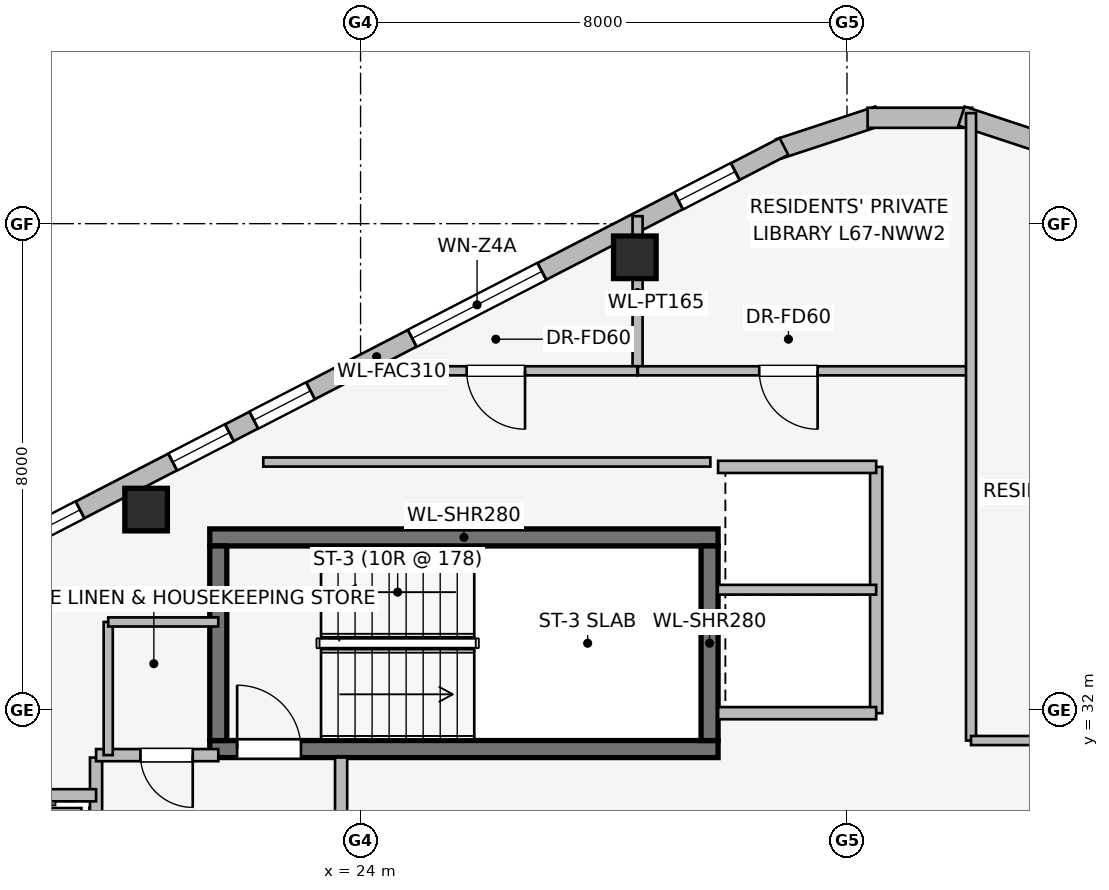
"""IFC4 building model, lengths in metres.
Left out: names, types, materials, properties, quantities, classifications, styles, units other than length and angle.
Written with IfcOpenShell. Run it as: python <this file> out.ifc"""

import sys

from ifc_helpers import new_model, si_unit, direction, frame, frame_2d, origin, origin_2d, place, context, subcontext, project, spatial, rectangle, extrude, element, fill, save


model = new_model("IFC4")
c1 = context("Model", 3, precision=1e-05, world=origin(), true_north=direction((0.0, 1.0)))
c2 = subcontext(c1, "Body", "Model", "MODEL_VIEW")
j1 = project(units=[si_unit("LENGTHUNIT", "METRE"), si_unit("PLANEANGLEUNIT", "RADIAN")], contexts=[c1])
p1 = place(None, origin())
s1 = spatial("IfcSite", under=j1, at=p1, CompositionType="ELEMENT")
p2 = place(p1, origin())
s2 = spatial("IfcBuilding", under=s1, at=p2, CompositionType="ELEMENT")
p3 = place(p2, frame((0.0, 0.0, 245.45)))
s3 = spatial("IfcBuildingStorey", under=s2, at=p3, CompositionType="ELEMENT", Elevation=245.45)
p4 = place(p3, frame((21.52, 31.36, 0.0), z_axis=(0.0, 0.0, 1.0), x_axis=(1.0, 0.0, 0.0)))
e1 = element("IfcWall", 1, at=p4, inside=s3, PredefinedType="SHEAR", context=c2, shape_type="SweptSolid", body=[
    extrude(rectangle(XDim=8.36, YDim=0.28, at=frame_2d((4.18, 0.0))), origin(), (0.0, 0.0, 1.0), 3.55),
])
p5 = place(p4, frame((0.45, 0.0, 0.0)))
e2 = element("IfcOpeningElement", 2, at=p5, cuts=e1, PredefinedType="OPENING", context=c2, shape_type="SweptSolid", body=[
    extrude(rectangle(XDim=1.05, YDim=2.0, at=frame_2d((0.525, 1.0))), frame((0.0, 0.15, 0.0), z_axis=(0.0, -1.0, 0.0), x_axis=(1.0, 0.0, 0.0)), (0.0, 0.0, 1.0), 0.3),
])
p6 = place(p3, frame((29.88, 34.84, 0.0), z_axis=(0.0, 0.0, 1.0), x_axis=(-1.0, 0.0, 0.0)))
e3 = element("IfcWall", 3, at=p6, inside=s3, PredefinedType="SHEAR", context=c2, shape_type="SweptSolid", body=[
    extrude(rectangle(XDim=8.36, YDim=0.28, at=frame_2d((4.18, 0.0))), origin(), (0.0, 0.0, 1.0), 3.55),
])
for number, where, z_axis, x_axis in (
    (4, (21.66, 34.7, 0.0), (0.0, 0.0, 1.0), (0.0, -1.0, 0.0)),
    (5, (29.74, 31.5, 0.0), (0.0, 0.0, 1.0), (0.0, 1.0, 0.0)),
):
    element("IfcWall", number, at=place(p3, frame(where, z_axis=z_axis, x_axis=x_axis)), inside=s3, PredefinedType="SHEAR", context=c2, shape_type="SweptSolid", body=[
        extrude(rectangle(XDim=3.2, YDim=0.28, at=frame_2d((1.6, 0.0))), origin(), (0.0, 0.0, 1.0), 3.55),
    ])
for number, where, z_axis, x_axis in (
    (6, (28.511, 39.447, 0.0), (0.0, 0.0, 1.0), (1.0, 0.0, 0.0)),
    (7, (20.473, 35.298, 0.0), (0.0, 0.0, 1.0), (1.0, 0.0, 0.0)),
):
    element("IfcColumn", number, at=place(p3, frame(where, z_axis=z_axis, x_axis=x_axis)), inside=s3, PredefinedType="COLUMN", context=c2, shape_type="SweptSolid", body=[
        extrude(rectangle(XDim=0.7, YDim=0.7, at=origin_2d()), origin(), (0.0, 0.0, 1.0), 3.55),
    ])
p7 = place(p3, frame((30.882, 41.231, 0.0), z_axis=(0.0, 0.0, 1.0), x_axis=(0.949713440491, 0.313120393699, 0.0)))
e8 = element("IfcWall", 8, at=p7, inside=s3, PredefinedType="STANDARD", context=c2, shape_type="SweptSolid", body=[
    extrude(rectangle(XDim=1.722, YDim=0.33, at=frame_2d((0.861, 0.0))), origin(), (0.0, 0.0, 1.0), 3.29),
])
p8 = place(p3, frame((32.339, 41.741, 0.0), z_axis=(0.0, 0.0, 1.0), x_axis=(1.0, 0.0, 0.0)))
e9 = element("IfcWall", 9, at=p8, inside=s3, PredefinedType="STANDARD", context=c2, shape_type="SweptSolid", body=[
    extrude(rectangle(XDim=1.722, YDim=0.33, at=frame_2d((0.861, 0.0))), origin(), (0.0, 0.0, 1.0), 3.29),
])
p9 = place(p3, frame((33.883, 41.77, 0.0), z_axis=(0.0, 0.0, 1.0), x_axis=(0.949713440491, -0.313120393699, 0.0)))
e10 = element("IfcWall", 10, at=p9, inside=s3, PredefinedType="STANDARD", context=c2, shape_type="SweptSolid", body=[
    extrude(rectangle(XDim=1.722, YDim=0.33, at=frame_2d((0.861, 0.0))), origin(), (0.0, 0.0, 1.0), 3.29),
])
p10 = place(p3, frame((17.566, 34.354, 0.0), z_axis=(0.0, 0.0, 1.0), x_axis=(0.888581481622, 0.458718814218, 0.0)))
e11 = element("IfcWall", 11, at=p10, inside=s3, PredefinedType="STANDARD", context=c2, shape_type="SweptSolid", body=[
    extrude(rectangle(XDim=15.077, YDim=0.31, at=frame_2d((7.539, 0.0))), origin(), (0.0, 0.0, 1.0), 2.594),
])
p11 = place(p10, frame((0.998, 0.0, 0.75)))
e12 = element("IfcOpeningElement", 12, at=p11, cuts=e11, PredefinedType="OPENING", context=c2, shape_type="SweptSolid", body=[
    extrude(rectangle(XDim=1.05, YDim=1.4, at=frame_2d((0.525, 0.7))), frame((0.0, 0.165, 0.0), z_axis=(0.0, -1.0, 0.0), x_axis=(1.0, 0.0, 0.0)), (0.0, 0.0, 1.0), 0.33),
])
p12 = place(p10, frame((3.763, 0.0, 0.75)))
e13 = element("IfcOpeningElement", 13, at=p12, cuts=e11, PredefinedType="OPENING", context=c2, shape_type="SweptSolid", body=[
    extrude(rectangle(XDim=1.05, YDim=1.4, at=frame_2d((0.525, 0.7))), frame((0.0, 0.165, 0.0), z_axis=(0.0, -1.0, 0.0), x_axis=(1.0, 0.0, 0.0)), (0.0, 0.0, 1.0), 0.33),
])
p13 = place(p10, frame((5.265, 0.0, 0.75)))
e14 = element("IfcOpeningElement", 14, at=p13, cuts=e11, PredefinedType="OPENING", context=c2, shape_type="SweptSolid", body=[
    extrude(rectangle(XDim=1.05, YDim=1.4, at=frame_2d((0.525, 0.7))), frame((0.0, 0.165, 0.0), z_axis=(0.0, -1.0, 0.0), x_axis=(1.0, 0.0, 0.0)), (0.0, 0.0, 1.0), 0.33),
])
p14 = place(p10, frame((8.197, 0.0, 0.75)))
e15 = element("IfcOpeningElement", 15, at=p14, cuts=e11, PredefinedType="OPENING", context=c2, shape_type="SweptSolid", body=[
    extrude(rectangle(XDim=2.4, YDim=1.6, at=frame_2d((1.2, 0.8))), frame((0.0, 0.165, 0.0), z_axis=(0.0, -1.0, 0.0), x_axis=(1.0, 0.0, 0.0)), (0.0, 0.0, 1.0), 0.33),
])
p15 = place(p10, frame((13.126, 0.0, 0.75)))
e16 = element("IfcOpeningElement", 16, at=p15, cuts=e11, PredefinedType="OPENING", context=c2, shape_type="SweptSolid", body=[
    extrude(rectangle(XDim=1.05, YDim=1.4, at=frame_2d((0.525, 0.7))), frame((0.0, 0.165, 0.0), z_axis=(0.0, -1.0, 0.0), x_axis=(1.0, 0.0, 0.0)), (0.0, 0.0, 1.0), 0.33),
])
p16 = place(p3, frame((19.65, 25.68, 0.0), z_axis=(0.0, 0.0, 1.0), x_axis=(0.0, 1.0, 0.0)))
e17 = element("IfcWall", 17, at=p16, inside=s3, PredefinedType="PARTITIONING", context=c2, shape_type="SweptSolid", body=[
    extrude(rectangle(XDim=5.54, YDim=0.2, at=frame_2d((2.77, 0.0))), origin(), (0.0, 0.0, 1.0), 3.29),
])
p17 = place(p16, frame((0.62, 0.0, 0.0)))
e18 = element("IfcOpeningElement", 18, at=p17, cuts=e17, PredefinedType="OPENING", context=c2, shape_type="SweptSolid", body=[
    extrude(rectangle(XDim=1.1, YDim=2.2, at=frame_2d((0.55, 1.1))), frame((0.0, 0.11, 0.0), z_axis=(0.0, -1.0, 0.0), x_axis=(1.0, 0.0, 0.0)), (0.0, 0.0, 1.0), 0.22),
])
p18 = place(p16, frame((3.12, 0.0, 0.0)))
e19 = element("IfcOpeningElement", 19, at=p18, cuts=e17, PredefinedType="OPENING", context=c2, shape_type="SweptSolid", body=[
    extrude(rectangle(XDim=1.1, YDim=2.2, at=frame_2d((0.55, 1.1))), frame((0.0, 0.11, 0.0), z_axis=(0.0, -1.0, 0.0), x_axis=(1.0, 0.0, 0.0)), (0.0, 0.0, 1.0), 0.22),
])
p19 = place(p3, frame((23.68, 25.68, 0.0), z_axis=(0.0, 0.0, 1.0), x_axis=(0.0, 1.0, 0.0)))
e20 = element("IfcWall", 20, at=p19, inside=s3, PredefinedType="PARTITIONING", context=c2, shape_type="SweptSolid", body=[
    extrude(rectangle(XDim=5.54, YDim=0.2, at=frame_2d((2.77, 0.0))), origin(), (0.0, 0.0, 1.0), 3.29),
])
p20 = place(p19, frame((1.8, 0.0, 0.0)))
e21 = element("IfcOpeningElement", 21, at=p20, cuts=e20, PredefinedType="OPENING", context=c2, shape_type="SweptSolid", body=[
    extrude(rectangle(XDim=1.05, YDim=2.0, at=frame_2d((0.525, 1.0))), frame((0.0, 0.11, 0.0), z_axis=(0.0, -1.0, 0.0), x_axis=(1.0, 0.0, 0.0)), (0.0, 0.0, 1.0), 0.22),
])
p21 = place(p3, frame((21.66, 31.26, 0.0), z_axis=(0.0, 0.0, 1.0), x_axis=(-1.0, 0.0, 0.0)))
e22 = element("IfcWall", 22, at=p21, inside=s3, PredefinedType="PARTITIONING", context=c2, shape_type="SweptSolid", body=[
    extrude(rectangle(XDim=2.01, YDim=0.2, at=frame_2d((1.005, 0.0))), origin(), (0.0, 0.0, 1.0), 3.29),
])
p22 = place(p21, frame((0.42, 0.0, 0.0)))
e23 = element("IfcOpeningElement", 23, at=p22, cuts=e22, PredefinedType="OPENING", context=c2, shape_type="SweptSolid", body=[
    extrude(rectangle(XDim=0.86, YDim=2.0, at=frame_2d((0.43, 1.0))), frame((0.0, 0.11, 0.0), z_axis=(0.0, -1.0, 0.0), x_axis=(1.0, 0.0, 0.0)), (0.0, 0.0, 1.0), 0.22),
])
p23 = place(p3, frame((19.65, 30.6, 0.0), z_axis=(0.0, 0.0, 1.0), x_axis=(-1.0, 0.0, 0.0)))
e24 = element("IfcWall", 24, at=p23, inside=s3, PredefinedType="PARTITIONING", context=c2, shape_type="SweptSolid", body=[
    extrude(rectangle(XDim=2.5, YDim=0.2, at=frame_2d((1.25, 0.0))), origin(), (0.0, 0.0, 1.0), 2.19),
])
p24 = place(p3, frame((32.48, 31.95, 0.0), z_axis=(0.0, 0.0, 1.0), x_axis=(0.0, 1.0, 0.0)))
e25 = element("IfcWall", 25, at=p24, inside=s3, PredefinedType="PARTITIONING", context=c2, shape_type="SweptSolid", body=[
    extrude(rectangle(XDim=4.05, YDim=0.2, at=frame_2d((2.025, 0.0))), origin(), (0.0, 0.0, 1.0), 3.29),
])
for number, where, z_axis, x_axis in (
    (26, (29.88, 36.0, 0.0), (0.0, 0.0, 1.0), (1.0, 0.0, 0.0)),
    (27, (32.48, 31.95, 0.0), (0.0, 0.0, 1.0), (-1.0, 0.0, 0.0)),
):
    element("IfcWall", number, at=place(p3, frame(where, z_axis=z_axis, x_axis=x_axis)), inside=s3, PredefinedType="PARTITIONING", context=c2, shape_type="SweptSolid", body=[
        extrude(rectangle(XDim=2.6, YDim=0.2, at=frame_2d((1.3, 0.0))), origin(), (0.0, 0.0, 1.0), 3.29),
    ])
p25 = place(p3, frame((29.875, 33.98, 0.0), z_axis=(0.0, 0.0, 1.0), x_axis=(1.0, 0.0, 0.0)))
e28 = element("IfcWall", 28, at=p25, inside=s3, PredefinedType="PARTITIONING", context=c2, shape_type="SweptSolid", body=[
    extrude(rectangle(XDim=2.605, YDim=0.16, at=frame_2d((1.302, 0.0))), origin(), (0.0, 0.0, 1.0), 3.29),
])
p26 = place(p3, frame((19.85, 33.45, 0.0), z_axis=(0.0, 0.0, 1.0), x_axis=(0.0, -1.0, 0.0)))
e29 = element("IfcWall", 29, at=p26, inside=s3, PredefinedType="PARTITIONING", context=c2, shape_type="SweptSolid", body=[
    extrude(rectangle(XDim=2.19, YDim=0.15, at=frame_2d((1.095, 0.0))), origin(), (0.0, 0.0, 1.0), 3.29),
])
p27 = place(p3, frame((21.66, 33.45, 0.0), z_axis=(0.0, 0.0, 1.0), x_axis=(-1.0, 0.0, 0.0)))
e30 = element("IfcWall", 30, at=p27, inside=s3, PredefinedType="PARTITIONING", context=c2, shape_type="SweptSolid", body=[
    extrude(rectangle(XDim=1.81, YDim=0.15, at=frame_2d((0.905, 0.0))), origin(), (0.0, 0.0, 1.0), 3.29),
])
p28 = place(p3, frame((28.556, 37.61, 0.0), z_axis=(0.0, 0.0, 1.0), x_axis=(0.0, 1.0, 0.0)))
e31 = element("IfcWall", 31, at=p28, inside=s3, PredefinedType="PARTITIONING", context=c2, shape_type="SweptSolid", body=[
    extrude(rectangle(XDim=2.513, YDim=0.165, at=frame_2d((1.256, 0.0))), origin(), (0.0, 0.0, 1.0), 2.679),
])
p29 = place(p3, frame((28.551, 37.58, 0.0), z_axis=(0.0, 0.0, 1.0), x_axis=(-1.0, 0.0, 0.0)))
e32 = element("IfcWall", 32, at=p29, inside=s3, PredefinedType="PARTITIONING", context=c2, shape_type="SweptSolid", body=[
    extrude(rectangle(XDim=4.889, YDim=0.15, at=frame_2d((2.444, 0.0))), origin(), (0.0, 0.0, 1.0), 2.682),
])
p30 = place(p29, frame((1.846, 0.0, 0.0)))
e33 = element("IfcOpeningElement", 33, at=p30, cuts=e32, PredefinedType="OPENING", context=c2, shape_type="SweptSolid", body=[
    extrude(rectangle(XDim=0.96, YDim=2.0, at=frame_2d((0.48, 1.0))), frame((0.0, 0.085, 0.0), z_axis=(0.0, -1.0, 0.0), x_axis=(1.0, 0.0, 0.0)), (0.0, 0.0, 1.0), 0.17),
])
p31 = place(p3, frame((33.962, 37.58, 0.0), z_axis=(0.0, 0.0, 1.0), x_axis=(-1.0, 0.0, 0.0)))
e34 = element("IfcWall", 34, at=p31, inside=s3, PredefinedType="PARTITIONING", context=c2, shape_type="SweptSolid", body=[
    extrude(rectangle(XDim=5.401, YDim=0.15, at=frame_2d((2.7, 0.0))), origin(), (0.0, 0.0, 1.0), 2.682),
])
p32 = place(p31, frame((2.445, 0.0, 0.0)))
e35 = element("IfcOpeningElement", 35, at=p32, cuts=e34, PredefinedType="OPENING", context=c2, shape_type="SweptSolid", body=[
    extrude(rectangle(XDim=0.96, YDim=2.0, at=frame_2d((0.48, 1.0))), frame((0.0, 0.085, 0.0), z_axis=(0.0, -1.0, 0.0), x_axis=(1.0, 0.0, 0.0)), (0.0, 0.0, 1.0), 0.17),
])
p33 = place(p3, frame((34.04, 31.5, 0.0), z_axis=(0.0, 0.0, 1.0), x_axis=(0.0, 1.0, 0.0)))
e36 = element("IfcWall", 36, at=p33, inside=s3, PredefinedType="PARTITIONING", context=c2, shape_type="SweptSolid", body=[
    extrude(rectangle(XDim=10.318, YDim=0.165, at=frame_2d((5.159, 0.0))), origin(), (0.0, 0.0, 1.0), 3.29),
])
p34 = place(p3, frame((41.46, 31.5, 0.0), z_axis=(0.0, 0.0, 1.0), x_axis=(-1.0, 0.0, 0.0)))
e37 = element("IfcWall", 37, at=p34, inside=s3, PredefinedType="PARTITIONING", context=c2, shape_type="SweptSolid", body=[
    extrude(rectangle(XDim=7.42, YDim=0.15, at=frame_2d((3.71, 0.0))), origin(), (0.0, 0.0, 1.0), 3.29),
])
p35 = place(p34, frame((3.23, 0.0, 0.0)))
e38 = element("IfcOpeningElement", 38, at=p35, cuts=e37, PredefinedType="OPENING", context=c2, shape_type="SweptSolid", body=[
    extrude(rectangle(XDim=0.96, YDim=2.0, at=frame_2d((0.48, 1.0))), frame((0.0, 0.085, 0.0), z_axis=(0.0, -1.0, 0.0), x_axis=(1.0, 0.0, 0.0)), (0.0, 0.0, 1.0), 0.17),
])
p36 = place(p3, frame((29.753, 36.08, 0.0), z_axis=(0.0, 0.0, 1.0), x_axis=(-1.0, 0.0, 0.0)))
e39 = element("IfcWall", 39, at=p36, inside=s3, PredefinedType="PARTITIONING", context=c2, shape_type="SweptSolid", body=[
    extrude(rectangle(XDim=7.353, YDim=0.15, at=frame_2d((3.677, 0.0))), origin(), (0.0, 0.0, 1.0), 2.682),
])
p37 = place(p11, origin())
e40 = element("IfcWindow", 40, at=p37, inside=s3, PartitioningType="SINGLE_PANEL", PredefinedType="WINDOW", context=c2, shape_type="SweptSolid", body=[
    extrude(rectangle(XDim=1.05, YDim=1.4, at=frame_2d((0.525, 0.7))), frame((0.0, 0.03, 0.0), z_axis=(0.0, -1.0, 0.0), x_axis=(1.0, 0.0, 0.0)), (0.0, 0.0, 1.0), 0.06),
])
fill(e12, e40)
p38 = place(p12, origin())
e41 = element("IfcWindow", 41, at=p38, inside=s3, PartitioningType="SINGLE_PANEL", PredefinedType="WINDOW", context=c2, shape_type="SweptSolid", body=[
    extrude(rectangle(XDim=1.05, YDim=1.4, at=frame_2d((0.525, 0.7))), frame((0.0, 0.03, 0.0), z_axis=(0.0, -1.0, 0.0), x_axis=(1.0, 0.0, 0.0)), (0.0, 0.0, 1.0), 0.06),
])
fill(e13, e41)
p39 = place(p13, origin())
e42 = element("IfcWindow", 42, at=p39, inside=s3, PartitioningType="SINGLE_PANEL", PredefinedType="WINDOW", context=c2, shape_type="SweptSolid", body=[
    extrude(rectangle(XDim=1.05, YDim=1.4, at=frame_2d((0.525, 0.7))), frame((0.0, 0.03, 0.0), z_axis=(0.0, -1.0, 0.0), x_axis=(1.0, 0.0, 0.0)), (0.0, 0.0, 1.0), 0.06),
])
fill(e14, e42)
p40 = place(p14, origin())
e43 = element("IfcWindow", 43, at=p40, inside=s3, PartitioningType="SINGLE_PANEL", PredefinedType="WINDOW", context=c2, shape_type="SweptSolid", body=[
    extrude(rectangle(XDim=2.4, YDim=1.6, at=frame_2d((1.2, 0.8))), frame((0.0, 0.03, 0.0), z_axis=(0.0, -1.0, 0.0), x_axis=(1.0, 0.0, 0.0)), (0.0, 0.0, 1.0), 0.06),
])
fill(e15, e43)
p41 = place(p15, origin())
e44 = element("IfcWindow", 44, at=p41, inside=s3, PartitioningType="SINGLE_PANEL", PredefinedType="WINDOW", context=c2, shape_type="SweptSolid", body=[
    extrude(rectangle(XDim=1.05, YDim=1.4, at=frame_2d((0.525, 0.7))), frame((0.0, 0.03, 0.0), z_axis=(0.0, -1.0, 0.0), x_axis=(1.0, 0.0, 0.0)), (0.0, 0.0, 1.0), 0.06),
])
fill(e16, e44)
p42 = place(p5, origin())
e45 = element("IfcDoor", 45, at=p42, inside=s3, OperationType="SINGLE_SWING_LEFT", PredefinedType="DOOR", context=c2, shape_type="SweptSolid", body=[
    extrude(rectangle(XDim=1.05, YDim=2.0, at=frame_2d((0.525, 1.0))), frame((0.0, 0.025, 0.0), z_axis=(0.0, -1.0, 0.0), x_axis=(1.0, 0.0, 0.0)), (0.0, 0.0, 1.0), 0.05),
])
fill(e2, e45)
p43 = place(p22, origin())
e46 = element("IfcDoor", 46, at=p43, inside=s3, OperationType="SINGLE_SWING_LEFT", PredefinedType="DOOR", context=c2, shape_type="SweptSolid", body=[
    extrude(rectangle(XDim=0.86, YDim=2.0, at=frame_2d((0.43, 1.0))), frame((0.0, 0.025, 0.0), z_axis=(0.0, -1.0, 0.0), x_axis=(1.0, 0.0, 0.0)), (0.0, 0.0, 1.0), 0.05),
])
fill(e23, e46)
p44 = place(p30, origin())
e47 = element("IfcDoor", 47, at=p44, inside=s3, OperationType="SINGLE_SWING_LEFT", PredefinedType="DOOR", context=c2, shape_type="SweptSolid", body=[
    extrude(rectangle(XDim=0.96, YDim=2.0, at=frame_2d((0.48, 1.0))), frame((0.0, 0.025, 0.0), z_axis=(0.0, -1.0, 0.0), x_axis=(1.0, 0.0, 0.0)), (0.0, 0.0, 1.0), 0.05),
])
fill(e33, e47)
p45 = place(p32, origin())
e48 = element("IfcDoor", 48, at=p45, inside=s3, OperationType="SINGLE_SWING_LEFT", PredefinedType="DOOR", context=c2, shape_type="SweptSolid", body=[
    extrude(rectangle(XDim=0.96, YDim=2.0, at=frame_2d((0.48, 1.0))), frame((0.0, 0.025, 0.0), z_axis=(0.0, -1.0, 0.0), x_axis=(1.0, 0.0, 0.0)), (0.0, 0.0, 1.0), 0.05),
])
fill(e35, e48)
save(model, sys.argv[1])
